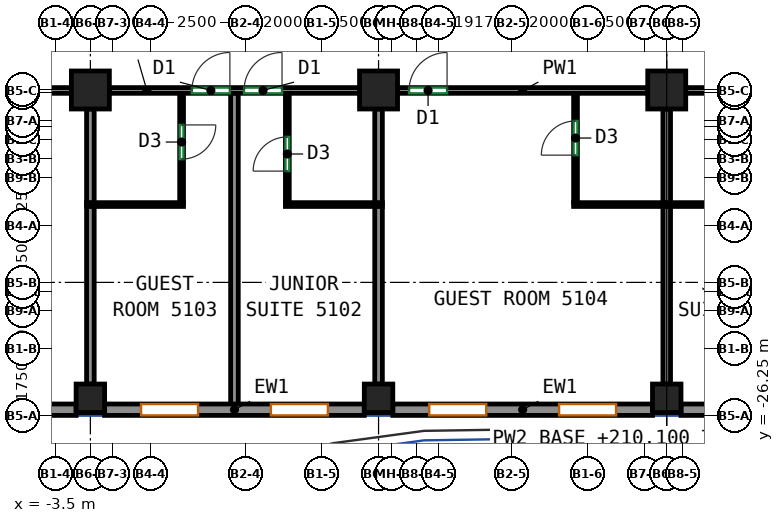
"""IFC4 building model, lengths in metres.
Left out: names, types, materials, properties, quantities, classifications, styles, units other than length and angle.
Written with IfcOpenShell. Run it as: python <this file> out.ifc"""

import sys

from ifc_helpers import new_model, si_unit, direction, frame, frame_2d, origin, origin_2d, place, context, subcontext, project, spatial, rectangle, extrude, source, transform, mapped, element, fill, save


model = new_model("IFC4")
c1 = context("Model", 3, precision=1e-05, world=origin(), true_north=direction((0.0, 1.0)))
c2 = subcontext(c1, "Body", "Model", "MODEL_VIEW")
j1 = project(units=[si_unit("LENGTHUNIT", "METRE"), si_unit("PLANEANGLEUNIT", "RADIAN")], contexts=[c1])
p1 = place(None, origin())
s1 = spatial("IfcSite", under=j1, at=p1, CompositionType="ELEMENT")
p2 = place(p1, origin())
s2 = spatial("IfcBuilding", under=s1, at=p2, CompositionType="ELEMENT")
p3 = place(p2, frame((0.0, 0.0, 210.1)))
s3 = spatial("IfcBuildingStorey", under=s2, at=p3, CompositionType="ELEMENT", Elevation=210.1)
m1 = source(origin(), c2, "Body", "SweptSolid", [
    extrude(rectangle(XDim=0.75, YDim=0.75, at=origin_2d()), origin(), (0.0, 0.0, 1.0), 3.12),
])
p4 = place(p3, frame((-2.583, -25.8, 0.0), z_axis=(0.0, 0.0, 1.0), x_axis=(1.0, 0.0, 0.0)))
e1 = element("IfcColumn", 1, at=p4, inside=s3, PredefinedType="COLUMN", context=c2, shape_type="MappedRepresentation", body=[
    mapped(m1, transform((0.0, 0.0, 0.0))),
])
m2 = source(origin(), c2, "Body", "SweptSolid", [
    extrude(rectangle(XDim=1.0, YDim=1.0, at=origin_2d()), origin(), (0.0, 0.0, 1.0), 3.12),
])
p5 = place(p3, frame((-2.583, -17.688, 0.0), z_axis=(0.0, 0.0, 1.0), x_axis=(1.0, 0.0, 0.0)))
e2 = element("IfcColumn", 2, at=p5, inside=s3, PredefinedType="COLUMN", context=c2, shape_type="MappedRepresentation", body=[
    mapped(m2, transform((0.0, 0.0, 0.0))),
])
p6 = place(p3, frame((5.0, -25.8, 0.0), z_axis=(0.0, 0.0, 1.0), x_axis=(1.0, 0.0, 0.0)))
e3 = element("IfcColumn", 3, at=p6, inside=s3, PredefinedType="COLUMN", context=c2, shape_type="MappedRepresentation", body=[
    mapped(m1, transform((0.0, 0.0, 0.0))),
])
p7 = place(p3, frame((5.0, -17.688, 0.0), z_axis=(0.0, 0.0, 1.0), x_axis=(1.0, 0.0, 0.0)))
e4 = element("IfcColumn", 4, at=p7, inside=s3, PredefinedType="COLUMN", context=c2, shape_type="MappedRepresentation", body=[
    mapped(m2, transform((0.0, 0.0, 0.0))),
])
p8 = place(p3, frame((12.583, -25.8, 0.0), z_axis=(0.0, 0.0, 1.0), x_axis=(1.0, 0.0, 0.0)))
e5 = element("IfcColumn", 5, at=p8, inside=s3, PredefinedType="COLUMN", context=c2, shape_type="MappedRepresentation", body=[
    mapped(m1, transform((0.0, 0.0, 0.0))),
])
p9 = place(p3, frame((12.583, -17.688, 0.0), z_axis=(0.0, 0.0, 1.0), x_axis=(1.0, 0.0, 0.0)))
e6 = element("IfcColumn", 6, at=p9, inside=s3, PredefinedType="COLUMN", context=c2, shape_type="MappedRepresentation", body=[
    mapped(m2, transform((0.0, 0.0, 0.0))),
])
m3 = source(origin(), c2, "Body", "SweptSolid", [
    extrude(rectangle(XDim=6.833, YDim=0.3, at=frame_2d((3.417, 0.0))), origin(), (0.0, 0.0, 1.0), 3.12),
])
p10 = place(p3, frame((-9.792, -26.1, 0.0), z_axis=(0.0, 0.0, 1.0), x_axis=(1.0, 0.0, 0.0)))
e7 = element("IfcWall", 7, at=p10, inside=s3, PredefinedType="SOLIDWALL", context=c2, shape_type="MappedRepresentation", body=[
    mapped(m3, transform((0.0, 0.0, 0.0))),
])
p11 = place(p10, frame((0.958, 0.0, 0.85)))
e8 = element("IfcOpeningElement", 8, at=p11, cuts=e7, PredefinedType="OPENING", context=c2, shape_type="SweptSolid", body=[
    extrude(rectangle(XDim=1.5, YDim=1.95, at=frame_2d((0.75, 0.975))), frame((0.0, 0.16, 0.0), z_axis=(0.0, -1.0, 0.0), x_axis=(1.0, 0.0, 0.0)), (0.0, 0.0, 1.0), 0.32),
])
p12 = place(p10, frame((4.375, 0.0, 0.85)))
e9 = element("IfcOpeningElement", 9, at=p12, cuts=e7, PredefinedType="OPENING", context=c2, shape_type="SweptSolid", body=[
    extrude(rectangle(XDim=1.5, YDim=1.95, at=frame_2d((0.75, 0.975))), frame((0.0, 0.16, 0.0), z_axis=(0.0, -1.0, 0.0), x_axis=(1.0, 0.0, 0.0)), (0.0, 0.0, 1.0), 0.32),
])
m4 = source(origin(), c2, "Body", "SweptSolid", [
    extrude(rectangle(XDim=6.833, YDim=0.3, at=frame_2d((3.417, 0.0))), origin(), (0.0, 0.0, 1.0), 3.12),
])
p13 = place(p3, frame((-2.208, -26.1, 0.0), z_axis=(0.0, 0.0, 1.0), x_axis=(1.0, 0.0, 0.0)))
e10 = element("IfcWall", 10, at=p13, inside=s3, PredefinedType="SOLIDWALL", context=c2, shape_type="MappedRepresentation", body=[
    mapped(m4, transform((0.0, 0.0, 0.0))),
])
p14 = place(p13, frame((0.958, 0.0, 0.85)))
e11 = element("IfcOpeningElement", 11, at=p14, cuts=e10, PredefinedType="OPENING", context=c2, shape_type="SweptSolid", body=[
    extrude(rectangle(XDim=1.5, YDim=1.95, at=frame_2d((0.75, 0.975))), frame((0.0, 0.16, 0.0), z_axis=(0.0, -1.0, 0.0), x_axis=(1.0, 0.0, 0.0)), (0.0, 0.0, 1.0), 0.32),
])
p15 = place(p13, frame((4.375, 0.0, 0.85)))
e12 = element("IfcOpeningElement", 12, at=p15, cuts=e10, PredefinedType="OPENING", context=c2, shape_type="SweptSolid", body=[
    extrude(rectangle(XDim=1.5, YDim=1.95, at=frame_2d((0.75, 0.975))), frame((0.0, 0.16, 0.0), z_axis=(0.0, -1.0, 0.0), x_axis=(1.0, 0.0, 0.0)), (0.0, 0.0, 1.0), 0.32),
])
p16 = place(p3, frame((5.375, -26.1, 0.0), z_axis=(0.0, 0.0, 1.0), x_axis=(1.0, 0.0, 0.0)))
e13 = element("IfcWall", 13, at=p16, inside=s3, PredefinedType="SOLIDWALL", context=c2, shape_type="MappedRepresentation", body=[
    mapped(m4, transform((0.0, 0.0, 0.0))),
])
p17 = place(p16, frame((0.958, 0.0, 0.85)))
e14 = element("IfcOpeningElement", 14, at=p17, cuts=e13, PredefinedType="OPENING", context=c2, shape_type="SweptSolid", body=[
    extrude(rectangle(XDim=1.5, YDim=1.95, at=frame_2d((0.75, 0.975))), frame((0.0, 0.16, 0.0), z_axis=(0.0, -1.0, 0.0), x_axis=(1.0, 0.0, 0.0)), (0.0, 0.0, 1.0), 0.32),
])
p18 = place(p16, frame((4.375, 0.0, 0.85)))
e15 = element("IfcOpeningElement", 15, at=p18, cuts=e13, PredefinedType="OPENING", context=c2, shape_type="SweptSolid", body=[
    extrude(rectangle(XDim=1.5, YDim=1.95, at=frame_2d((0.75, 0.975))), frame((0.0, 0.16, 0.0), z_axis=(0.0, -1.0, 0.0), x_axis=(1.0, 0.0, 0.0)), (0.0, 0.0, 1.0), 0.32),
])
p19 = place(p3, frame((12.958, -26.1, 0.0), z_axis=(0.0, 0.0, 1.0), x_axis=(1.0, 0.0, 0.0)))
e16 = element("IfcWall", 16, at=p19, inside=s3, PredefinedType="SOLIDWALL", context=c2, shape_type="MappedRepresentation", body=[
    mapped(m3, transform((0.0, 0.0, 0.0))),
])
p20 = place(p19, frame((0.958, 0.0, 0.85)))
e17 = element("IfcOpeningElement", 17, at=p20, cuts=e16, PredefinedType="OPENING", context=c2, shape_type="SweptSolid", body=[
    extrude(rectangle(XDim=1.5, YDim=1.95, at=frame_2d((0.75, 0.975))), frame((0.0, 0.16, 0.0), z_axis=(0.0, -1.0, 0.0), x_axis=(1.0, 0.0, 0.0)), (0.0, 0.0, 1.0), 0.32),
])
p21 = place(p19, frame((4.375, 0.0, 0.85)))
e18 = element("IfcOpeningElement", 18, at=p21, cuts=e16, PredefinedType="OPENING", context=c2, shape_type="SweptSolid", body=[
    extrude(rectangle(XDim=1.5, YDim=1.95, at=frame_2d((0.75, 0.975))), frame((0.0, 0.16, 0.0), z_axis=(0.0, -1.0, 0.0), x_axis=(1.0, 0.0, 0.0)), (0.0, 0.0, 1.0), 0.32),
])
p22 = place(p3, frame((-9.667, -17.7, 0.0), z_axis=(0.0, 0.0, 1.0), x_axis=(1.0, 0.0, 0.0)))
e19 = element("IfcWall", 19, at=p22, inside=s3, PredefinedType="PARTITIONING", context=c2, shape_type="SweptSolid", body=[
    extrude(rectangle(XDim=6.584, YDim=0.15, at=frame_2d((3.292, 0.0))), origin(), (0.0, 0.0, 1.0), 3.12),
])
p23 = place(p22, frame((3.119, 0.0, 0.0)))
e20 = element("IfcOpeningElement", 20, at=p23, cuts=e19, PredefinedType="OPENING", context=c2, shape_type="SweptSolid", body=[
    extrude(rectangle(XDim=1.0, YDim=2.1, at=frame_2d((0.5, 1.05))), frame((0.0, 0.085, 0.0), z_axis=(0.0, -1.0, 0.0), x_axis=(1.0, 0.0, 0.0)), (0.0, 0.0, 1.0), 0.17),
])
p24 = place(p3, frame((-2.083, -17.7, 0.0), z_axis=(0.0, 0.0, 1.0), x_axis=(1.0, 0.0, 0.0)))
e21 = element("IfcWall", 21, at=p24, inside=s3, PredefinedType="PARTITIONING", context=c2, shape_type="SweptSolid", body=[
    extrude(rectangle(XDim=6.583, YDim=0.15, at=frame_2d((3.292, 0.0))), origin(), (0.0, 0.0, 1.0), 3.12),
])
p25 = place(p24, frame((2.171, 0.0, 0.0)))
e22 = element("IfcOpeningElement", 22, at=p25, cuts=e21, PredefinedType="OPENING", context=c2, shape_type="SweptSolid", body=[
    extrude(rectangle(XDim=1.0, YDim=2.1, at=frame_2d((0.5, 1.05))), frame((0.0, 0.085, 0.0), z_axis=(0.0, -1.0, 0.0), x_axis=(1.0, 0.0, 0.0)), (0.0, 0.0, 1.0), 0.17),
])
p26 = place(p24, frame((3.543, 0.0, 0.0)))
e23 = element("IfcOpeningElement", 23, at=p26, cuts=e21, PredefinedType="OPENING", context=c2, shape_type="SweptSolid", body=[
    extrude(rectangle(XDim=1.0, YDim=2.1, at=frame_2d((0.5, 1.05))), frame((0.0, 0.085, 0.0), z_axis=(0.0, -1.0, 0.0), x_axis=(1.0, 0.0, 0.0)), (0.0, 0.0, 1.0), 0.17),
])
p27 = place(p3, frame((5.5, -17.7, 0.0), z_axis=(0.0, 0.0, 1.0), x_axis=(1.0, 0.0, 0.0)))
e24 = element("IfcWall", 24, at=p27, inside=s3, PredefinedType="PARTITIONING", context=c2, shape_type="SweptSolid", body=[
    extrude(rectangle(XDim=6.583, YDim=0.15, at=frame_2d((3.292, 0.0))), origin(), (0.0, 0.0, 1.0), 3.12),
])
p28 = place(p27, frame((0.303, 0.0, 0.0)))
e25 = element("IfcOpeningElement", 25, at=p28, cuts=e24, PredefinedType="OPENING", context=c2, shape_type="SweptSolid", body=[
    extrude(rectangle(XDim=1.0, YDim=2.1, at=frame_2d((0.5, 1.05))), frame((0.0, 0.085, 0.0), z_axis=(0.0, -1.0, 0.0), x_axis=(1.0, 0.0, 0.0)), (0.0, 0.0, 1.0), 0.17),
])
p29 = place(p3, frame((13.083, -17.7, 0.0), z_axis=(0.0, 0.0, 1.0), x_axis=(1.0, 0.0, 0.0)))
e26 = element("IfcWall", 26, at=p29, inside=s3, PredefinedType="PARTITIONING", context=c2, shape_type="SweptSolid", body=[
    extrude(rectangle(XDim=6.584, YDim=0.15, at=frame_2d((3.292, 0.0))), origin(), (0.0, 0.0, 1.0), 3.12),
])
p30 = place(p29, frame((2.102, 0.0, 0.0)))
e27 = element("IfcOpeningElement", 27, at=p30, cuts=e26, PredefinedType="OPENING", context=c2, shape_type="SweptSolid", body=[
    extrude(rectangle(XDim=1.0, YDim=2.1, at=frame_2d((0.5, 1.05))), frame((0.0, 0.085, 0.0), z_axis=(0.0, -1.0, 0.0), x_axis=(1.0, 0.0, 0.0)), (0.0, 0.0, 1.0), 0.17),
])
p31 = place(p29, frame((3.494, 0.0, 0.0)))
e28 = element("IfcOpeningElement", 28, at=p31, cuts=e26, PredefinedType="OPENING", context=c2, shape_type="SweptSolid", body=[
    extrude(rectangle(XDim=1.0, YDim=2.1, at=frame_2d((0.5, 1.05))), frame((0.0, 0.085, 0.0), z_axis=(0.0, -1.0, 0.0), x_axis=(1.0, 0.0, 0.0)), (0.0, 0.0, 1.0), 0.17),
])
p32 = place(p3, frame((-2.583, -25.425, 0.0), z_axis=(0.0, 0.0, 1.0), x_axis=(0.0, 1.0, 0.0)))
e29 = element("IfcWall", 29, at=p32, inside=s3, PredefinedType="PARTITIONING", context=c2, shape_type="SweptSolid", body=[
    extrude(rectangle(XDim=4.683, YDim=0.2, at=frame_2d((2.342, 0.0))), origin(), (0.0, 0.0, 1.0), 3.12),
])
p33 = place(p3, frame((-2.583, -20.662, 0.0), z_axis=(0.0, 0.0, 1.0), x_axis=(0.0, 1.0, 0.0)))
e30 = element("IfcWall", 30, at=p33, inside=s3, PredefinedType="PARTITIONING", context=c2, shape_type="SweptSolid", body=[
    extrude(rectangle(XDim=2.474, YDim=0.2, at=frame_2d((1.237, 0.0))), origin(), (0.0, 0.0, 1.0), 3.12),
])
p34 = place(p3, frame((-0.183, -17.777, 0.0), z_axis=(0.0, 0.0, 1.0), x_axis=(0.0, -1.0, 0.0)))
e31 = element("IfcWall", 31, at=p34, inside=s3, PredefinedType="PARTITIONING", context=c2, shape_type="SweptSolid", body=[
    extrude(rectangle(XDim=2.875, YDim=0.1, at=frame_2d((1.438, 0.0))), origin(), (0.0, 0.0, 1.0), 3.12),
])
p35 = place(p34, frame((0.83, 0.0, 0.0)))
e32 = element("IfcOpeningElement", 32, at=p35, cuts=e31, PredefinedType="OPENING", context=c2, shape_type="SweptSolid", body=[
    extrude(rectangle(XDim=0.9, YDim=2.1, at=frame_2d((0.45, 1.05))), frame((0.0, 0.06, 0.0), z_axis=(0.0, -1.0, 0.0), x_axis=(1.0, 0.0, 0.0)), (0.0, 0.0, 1.0), 0.12),
])
p36 = place(p3, frame((-2.683, -20.702, 0.0), z_axis=(0.0, 0.0, 1.0), x_axis=(1.0, 0.0, 0.0)))
e33 = element("IfcWall", 33, at=p36, inside=s3, PredefinedType="PARTITIONING", context=c2, shape_type="SweptSolid", body=[
    extrude(rectangle(XDim=2.55, YDim=0.1, at=frame_2d((1.275, 0.0))), origin(), (0.0, 0.0, 1.0), 3.12),
])
p37 = place(p3, frame((1.208, -26.0, 0.0), z_axis=(0.0, 0.0, 1.0), x_axis=(0.0, 1.0, 0.0)))
e34 = element("IfcWall", 34, at=p37, inside=s3, PredefinedType="PARTITIONING", context=c2, shape_type="SweptSolid", body=[
    extrude(rectangle(XDim=8.223, YDim=0.2, at=frame_2d((4.111, 0.0))), origin(), (0.0, 0.0, 1.0), 3.12),
])
p38 = place(p3, frame((2.6, -20.652, 0.0), z_axis=(0.0, 0.0, 1.0), x_axis=(0.0, 1.0, 0.0)))
e35 = element("IfcWall", 35, at=p38, inside=s3, PredefinedType="PARTITIONING", context=c2, shape_type="SweptSolid", body=[
    extrude(rectangle(XDim=2.875, YDim=0.1, at=frame_2d((1.438, 0.0))), origin(), (0.0, 0.0, 1.0), 3.12),
])
p39 = place(p38, frame((0.83, 0.0, 0.0)))
e36 = element("IfcOpeningElement", 36, at=p39, cuts=e35, PredefinedType="OPENING", context=c2, shape_type="SweptSolid", body=[
    extrude(rectangle(XDim=0.9, YDim=2.1, at=frame_2d((0.45, 1.05))), frame((0.0, 0.06, 0.0), z_axis=(0.0, -1.0, 0.0), x_axis=(1.0, 0.0, 0.0)), (0.0, 0.0, 1.0), 0.12),
])
p40 = place(p3, frame((2.55, -20.702, 0.0), z_axis=(0.0, 0.0, 1.0), x_axis=(1.0, 0.0, 0.0)))
e37 = element("IfcWall", 37, at=p40, inside=s3, PredefinedType="PARTITIONING", context=c2, shape_type="SweptSolid", body=[
    extrude(rectangle(XDim=2.55, YDim=0.1, at=frame_2d((1.275, 0.0))), origin(), (0.0, 0.0, 1.0), 3.12),
])
p41 = place(p3, frame((5.0, -25.425, 0.0), z_axis=(0.0, 0.0, 1.0), x_axis=(0.0, 1.0, 0.0)))
e38 = element("IfcWall", 38, at=p41, inside=s3, PredefinedType="PARTITIONING", context=c2, shape_type="SweptSolid", body=[
    extrude(rectangle(XDim=4.673, YDim=0.2, at=frame_2d((2.336, 0.0))), origin(), (0.0, 0.0, 1.0), 3.12),
])
p42 = place(p3, frame((5.0, -20.652, 0.0), z_axis=(0.0, 0.0, 1.0), x_axis=(0.0, 1.0, 0.0)))
e39 = element("IfcWall", 39, at=p42, inside=s3, PredefinedType="PARTITIONING", context=c2, shape_type="SweptSolid", body=[
    extrude(rectangle(XDim=2.464, YDim=0.2, at=frame_2d((1.232, 0.0))), origin(), (0.0, 0.0, 1.0), 3.12),
])
p43 = place(p3, frame((10.183, -20.652, 0.0), z_axis=(0.0, 0.0, 1.0), x_axis=(0.0, 1.0, 0.0)))
e40 = element("IfcWall", 40, at=p43, inside=s3, PredefinedType="PARTITIONING", context=c2, shape_type="SweptSolid", body=[
    extrude(rectangle(XDim=2.875, YDim=0.1, at=frame_2d((1.438, 0.0))), origin(), (0.0, 0.0, 1.0), 3.12),
])
p44 = place(p43, frame((1.25, 0.0, 0.0)))
e41 = element("IfcOpeningElement", 41, at=p44, cuts=e40, PredefinedType="OPENING", context=c2, shape_type="SweptSolid", body=[
    extrude(rectangle(XDim=0.9, YDim=2.1, at=frame_2d((0.45, 1.05))), frame((0.0, 0.06, 0.0), z_axis=(0.0, -1.0, 0.0), x_axis=(1.0, 0.0, 0.0)), (0.0, 0.0, 1.0), 0.12),
])
p45 = place(p3, frame((10.133, -20.702, 0.0), z_axis=(0.0, 0.0, 1.0), x_axis=(1.0, 0.0, 0.0)))
e42 = element("IfcWall", 42, at=p45, inside=s3, PredefinedType="PARTITIONING", context=c2, shape_type="SweptSolid", body=[
    extrude(rectangle(XDim=4.9, YDim=0.1, at=frame_2d((2.45, 0.0))), origin(), (0.0, 0.0, 1.0), 3.12),
])
p46 = place(p3, frame((12.583, -25.425, 0.0), z_axis=(0.0, 0.0, 1.0), x_axis=(0.0, 1.0, 0.0)))
e43 = element("IfcWall", 43, at=p46, inside=s3, PredefinedType="PARTITIONING", context=c2, shape_type="SweptSolid", body=[
    extrude(rectangle(XDim=4.673, YDim=0.2, at=frame_2d((2.336, 0.0))), origin(), (0.0, 0.0, 1.0), 3.12),
])
p47 = place(p3, frame((12.583, -20.652, 0.0), z_axis=(0.0, 0.0, 1.0), x_axis=(0.0, 1.0, 0.0)))
e44 = element("IfcWall", 44, at=p47, inside=s3, PredefinedType="PARTITIONING", context=c2, shape_type="SweptSolid", body=[
    extrude(rectangle(XDim=2.464, YDim=0.2, at=frame_2d((1.232, 0.0))), origin(), (0.0, 0.0, 1.0), 3.12),
])
p48 = place(p14, origin())
e45 = element("IfcWindow", 45, at=p48, inside=s3, PartitioningType="SINGLE_PANEL", PredefinedType="WINDOW", context=c2, shape_type="SweptSolid", body=[
    extrude(rectangle(XDim=1.5, YDim=1.95, at=frame_2d((0.75, 0.975))), frame((0.0, 0.03, 0.0), z_axis=(0.0, -1.0, 0.0), x_axis=(1.0, 0.0, 0.0)), (0.0, 0.0, 1.0), 0.06),
])
fill(e11, e45)
p49 = place(p15, origin())
e46 = element("IfcWindow", 46, at=p49, inside=s3, PartitioningType="SINGLE_PANEL", PredefinedType="WINDOW", context=c2, shape_type="SweptSolid", body=[
    extrude(rectangle(XDim=1.5, YDim=1.95, at=frame_2d((0.75, 0.975))), frame((0.0, 0.03, 0.0), z_axis=(0.0, -1.0, 0.0), x_axis=(1.0, 0.0, 0.0)), (0.0, 0.0, 1.0), 0.06),
])
fill(e12, e46)
p50 = place(p17, origin())
e47 = element("IfcWindow", 47, at=p50, inside=s3, PartitioningType="SINGLE_PANEL", PredefinedType="WINDOW", context=c2, shape_type="SweptSolid", body=[
    extrude(rectangle(XDim=1.5, YDim=1.95, at=frame_2d((0.75, 0.975))), frame((0.0, 0.03, 0.0), z_axis=(0.0, -1.0, 0.0), x_axis=(1.0, 0.0, 0.0)), (0.0, 0.0, 1.0), 0.06),
])
fill(e14, e47)
p51 = place(p18, origin())
e48 = element("IfcWindow", 48, at=p51, inside=s3, PartitioningType="SINGLE_PANEL", PredefinedType="WINDOW", context=c2, shape_type="SweptSolid", body=[
    extrude(rectangle(XDim=1.5, YDim=1.95, at=frame_2d((0.75, 0.975))), frame((0.0, 0.03, 0.0), z_axis=(0.0, -1.0, 0.0), x_axis=(1.0, 0.0, 0.0)), (0.0, 0.0, 1.0), 0.06),
])
fill(e15, e48)
p52 = place(p39, origin())
e49 = element("IfcDoor", 49, at=p52, inside=s3, OperationType="SINGLE_SWING_LEFT", PredefinedType="DOOR", context=c2, shape_type="SweptSolid", body=[
    extrude(rectangle(XDim=0.9, YDim=2.1, at=frame_2d((0.45, 1.05))), frame((0.0, 0.025, 0.0), z_axis=(0.0, -1.0, 0.0), x_axis=(1.0, 0.0, 0.0)), (0.0, 0.0, 1.0), 0.05),
])
fill(e36, e49)
p53 = place(p35, origin())
e50 = element("IfcDoor", 50, at=p53, inside=s3, OperationType="SINGLE_SWING_LEFT", PredefinedType="DOOR", context=c2, shape_type="SweptSolid", body=[
    extrude(rectangle(XDim=0.9, YDim=2.1, at=frame_2d((0.45, 1.05))), frame((0.0, 0.025, 0.0), z_axis=(0.0, -1.0, 0.0), x_axis=(1.0, 0.0, 0.0)), (0.0, 0.0, 1.0), 0.05),
])
fill(e32, e50)
p54 = place(p44, origin())
e51 = element("IfcDoor", 51, at=p54, inside=s3, OperationType="SINGLE_SWING_LEFT", PredefinedType="DOOR", context=c2, shape_type="SweptSolid", body=[
    extrude(rectangle(XDim=0.9, YDim=2.1, at=frame_2d((0.45, 1.05))), frame((0.0, 0.025, 0.0), z_axis=(0.0, -1.0, 0.0), x_axis=(1.0, 0.0, 0.0)), (0.0, 0.0, 1.0), 0.05),
])
fill(e41, e51)
p55 = place(p25, origin())
e52 = element("IfcDoor", 52, at=p55, inside=s3, OperationType="SINGLE_SWING_RIGHT", PredefinedType="DOOR", context=c2, shape_type="SweptSolid", body=[
    extrude(rectangle(XDim=1.0, YDim=2.1, at=frame_2d((0.5, 1.05))), frame((0.0, 0.025, 0.0), z_axis=(0.0, -1.0, 0.0), x_axis=(1.0, 0.0, 0.0)), (0.0, 0.0, 1.0), 0.05),
])
fill(e22, e52)
p56 = place(p26, origin())
e53 = element("IfcDoor", 53, at=p56, inside=s3, OperationType="SINGLE_SWING_RIGHT", PredefinedType="DOOR", context=c2, shape_type="SweptSolid", body=[
    extrude(rectangle(XDim=1.0, YDim=2.1, at=frame_2d((0.5, 1.05))), frame((0.0, 0.025, 0.0), z_axis=(0.0, -1.0, 0.0), x_axis=(1.0, 0.0, 0.0)), (0.0, 0.0, 1.0), 0.05),
])
fill(e23, e53)
p57 = place(p28, origin())
e54 = element("IfcDoor", 54, at=p57, inside=s3, OperationType="SINGLE_SWING_RIGHT", PredefinedType="DOOR", context=c2, shape_type="SweptSolid", body=[
    extrude(rectangle(XDim=1.0, YDim=2.1, at=frame_2d((0.5, 1.05))), frame((0.0, 0.025, 0.0), z_axis=(0.0, -1.0, 0.0), x_axis=(1.0, 0.0, 0.0)), (0.0, 0.0, 1.0), 0.05),
])
fill(e25, e54)
save(model, sys.argv[1])
